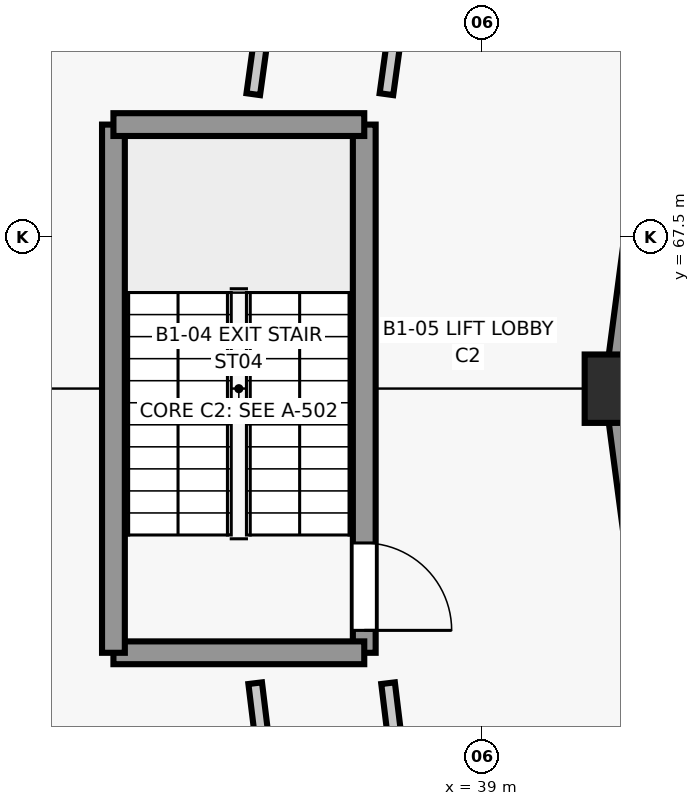
"""IFC4 building model, lengths in metres.
Left out: names, types, materials, properties, quantities, classifications, styles, units other than length and angle.
Written with IfcOpenShell. Run it as: python <this file> out.ifc"""

import sys

from ifc_helpers import new_model, si_unit, direction, frame, frame_2d, origin, origin_2d, place, context, subcontext, project, spatial, rectangle, circle, extrude, element, fill, save


model = new_model("IFC4")
c1 = context("Model", 3, precision=1e-05, world=origin(), true_north=direction((0.0, 1.0)))
c2 = subcontext(c1, "Body", "Model", "MODEL_VIEW")
j1 = project(units=[si_unit("LENGTHUNIT", "METRE"), si_unit("PLANEANGLEUNIT", "RADIAN")], contexts=[c1])
p1 = place(None, origin())
s1 = spatial("IfcSite", under=j1, at=p1, CompositionType="ELEMENT")
p2 = place(p1, origin())
s2 = spatial("IfcBuilding", under=s1, at=p2, CompositionType="ELEMENT")
p3 = place(p2, frame((0.0, 0.0, -4.2)))
s3 = spatial("IfcBuildingStorey", under=s2, at=p3, CompositionType="ELEMENT", Elevation=-4.2)
p4 = place(p3, frame((40.8, 65.5, 0.0), z_axis=(0.0, 0.0, 1.0), x_axis=(1.0, 0.0, 0.0)))
e1 = element("IfcColumn", 1, at=p4, inside=s3, PredefinedType="COLUMN", context=c2, shape_type="SweptSolid", body=[
    extrude(circle(Radius=0.45, at=origin_2d()), origin(), (0.0, 0.0, 1.0), 4.2),
])
p5 = place(p3, frame((31.963, 65.975, 0.0), z_axis=(0.0, 0.0, 1.0), x_axis=(0.130513242145, 0.991446566197, 0.0)))
e2 = element("IfcWall", 2, at=p5, inside=s3, PredefinedType="SHEAR", context=c2, shape_type="SweptSolid", body=[
    extrude(rectangle(XDim=11.076, YDim=0.4, at=frame_2d((5.538, 0.0))), origin(), (0.0, 0.0, 1.0), 3.92),
])
p6 = place(p3, frame((42.031, 74.853, 0.0), z_axis=(0.0, 0.0, 1.0), x_axis=(-0.130549698469, -0.991441766434, 0.0)))
e3 = element("IfcWall", 3, at=p6, inside=s3, PredefinedType="SHEAR", context=c2, shape_type="SweptSolid", body=[
    extrude(rectangle(XDim=9.156, YDim=0.38, at=frame_2d((4.578, 0.0))), origin(), (0.0, 0.0, 1.0), 3.92),
])
p7 = place(p3, frame((33.408, 54.044, 0.0), z_axis=(0.0, 0.0, 1.0), x_axis=(-0.130513242145, 0.991446566197, 0.0)))
e4 = element("IfcWall", 4, at=p7, inside=s3, PredefinedType="SHEAR", context=c2, shape_type="SweptSolid", body=[
    extrude(rectangle(XDim=11.076, YDim=0.4, at=frame_2d((5.538, 0.0))), origin(), (0.0, 0.0, 1.0), 3.92),
])
p8 = place(p3, frame((40.836, 65.225, 0.0), z_axis=(0.0, 0.0, 1.0), x_axis=(0.130549698469, -0.991441766434, 0.0)))
e5 = element("IfcWall", 5, at=p8, inside=s3, PredefinedType="SHEAR", context=c2, shape_type="SweptSolid", body=[
    extrude(rectangle(XDim=9.156, YDim=0.38, at=frame_2d((4.578, 0.0))), origin(), (0.0, 0.0, 1.0), 3.92),
])
p9 = place(p3, frame((37.45, 68.975, 0.0), z_axis=(0.0, 0.0, 1.0), x_axis=(0.0, -1.0, 0.0)))
e6 = element("IfcWall", 6, at=p9, inside=s3, PredefinedType="SHEAR", context=c2, shape_type="SweptSolid", body=[
    extrude(rectangle(XDim=6.95, YDim=0.3, at=frame_2d((3.475, 0.0))), origin(), (0.0, 0.0, 1.0), 4.2),
])
p10 = place(p9, frame((5.505, 0.0, 0.0)))
e7 = element("IfcOpeningElement", 7, at=p10, cuts=e6, PredefinedType="OPENING", context=c2, shape_type="SweptSolid", body=[
    extrude(rectangle(XDim=1.15, YDim=2.15, at=frame_2d((0.575, 1.075))), frame((0.0, 0.16, 0.0), z_axis=(0.0, -1.0, 0.0), x_axis=(1.0, 0.0, 0.0)), (0.0, 0.0, 1.0), 0.32),
])
p11 = place(p3, frame((37.45, 62.025, 0.0), z_axis=(0.0, 0.0, 1.0), x_axis=(-1.0, 0.0, 0.0)))
e8 = element("IfcWall", 8, at=p11, inside=s3, PredefinedType="SHEAR", context=c2, shape_type="SweptSolid", body=[
    extrude(rectangle(XDim=3.3, YDim=0.3, at=frame_2d((1.65, 0.0))), origin(), (0.0, 0.0, 1.0), 4.2),
])
p12 = place(p3, frame((34.15, 62.025, 0.0), z_axis=(0.0, 0.0, 1.0), x_axis=(0.0, 1.0, 0.0)))
e9 = element("IfcWall", 9, at=p12, inside=s3, PredefinedType="SHEAR", context=c2, shape_type="SweptSolid", body=[
    extrude(rectangle(XDim=6.95, YDim=0.3, at=frame_2d((3.475, 0.0))), origin(), (0.0, 0.0, 1.0), 4.2),
])
p13 = place(p3, frame((34.15, 68.975, 0.0), z_axis=(0.0, 0.0, 1.0), x_axis=(1.0, 0.0, 0.0)))
e10 = element("IfcWall", 10, at=p13, inside=s3, PredefinedType="SHEAR", context=c2, shape_type="SweptSolid", body=[
    extrude(rectangle(XDim=3.3, YDim=0.3, at=frame_2d((1.65, 0.0))), origin(), (0.0, 0.0, 1.0), 4.2),
])
p14 = place(p3, frame((37.001, 76.695, 0.0), z_axis=(0.0, 0.0, 1.0), x_axis=(-0.136812919882, -0.990596903363, 0.0)))
e11 = element("IfcWall", 11, at=p14, inside=s3, PredefinedType="PARTITIONING", context=c2, shape_type="SweptSolid", body=[
    extrude(rectangle(XDim=7.39, YDim=0.18, at=frame_2d((3.695, 0.0))), origin(), (0.0, 0.0, 1.0), 3.915),
])
p15 = place(p14, frame((2.97, 0.0, 0.0)))
e12 = element("IfcOpeningElement", 12, at=p15, cuts=e11, PredefinedType="OPENING", context=c2, shape_type="SweptSolid", body=[
    extrude(rectangle(XDim=1.45, YDim=2.2, at=frame_2d((0.725, 1.1))), frame((0.0, 0.1, 0.0), z_axis=(0.0, -1.0, 0.0), x_axis=(1.0, 0.0, 0.0)), (0.0, 0.0, 1.0), 0.2),
])
p16 = place(p3, frame((38.689, 76.234, 0.0), z_axis=(0.0, 0.0, 1.0), x_axis=(-0.136839031307, -0.990593296722, 0.0)))
e13 = element("IfcWall", 13, at=p16, inside=s3, PredefinedType="PARTITIONING", context=c2, shape_type="SweptSolid", body=[
    extrude(rectangle(XDim=6.924, YDim=0.18, at=frame_2d((3.462, 0.0))), origin(), (0.0, 0.0, 1.0), 3.915),
])
p17 = place(p16, frame((2.987, 0.0, 0.0)))
e14 = element("IfcOpeningElement", 14, at=p17, cuts=e13, PredefinedType="OPENING", context=c2, shape_type="SweptSolid", body=[
    extrude(rectangle(XDim=0.95, YDim=2.1, at=frame_2d((0.475, 1.05))), frame((0.0, 0.1, 0.0), z_axis=(0.0, -1.0, 0.0), x_axis=(1.0, 0.0, 0.0)), (0.0, 0.0, 1.0), 0.2),
])
p18 = place(p3, frame((36.015, 61.625, 0.0), z_axis=(0.0, 0.0, 1.0), x_axis=(0.121095426368, -0.992640870463, 0.0)))
e15 = element("IfcWall", 15, at=p18, inside=s3, PredefinedType="PARTITIONING", context=c2, shape_type="SweptSolid", body=[
    extrude(rectangle(XDim=6.718, YDim=0.18, at=frame_2d((3.359, 0.0))), origin(), (0.0, 0.0, 1.0), 3.915),
])
p19 = place(p18, frame((2.834, 0.0, 0.0)))
e16 = element("IfcOpeningElement", 16, at=p19, cuts=e15, PredefinedType="OPENING", context=c2, shape_type="SweptSolid", body=[
    extrude(rectangle(XDim=1.05, YDim=2.1, at=frame_2d((0.525, 1.05))), frame((0.0, 0.1, 0.0), z_axis=(0.0, -1.0, 0.0), x_axis=(1.0, 0.0, 0.0)), (0.0, 0.0, 1.0), 0.2),
])
p20 = place(p3, frame((37.763, 61.625, 0.0), z_axis=(0.0, 0.0, 1.0), x_axis=(0.12105344106, -0.992645991483, 0.0)))
e17 = element("IfcWall", 17, at=p20, inside=s3, PredefinedType="PARTITIONING", context=c2, shape_type="SweptSolid", body=[
    extrude(rectangle(XDim=6.28, YDim=0.18, at=frame_2d((3.14, 0.0))), origin(), (0.0, 0.0, 1.0), 3.915),
])
p21 = place(p20, frame((2.54, 0.0, 0.0)))
e18 = element("IfcOpeningElement", 18, at=p21, cuts=e17, PredefinedType="OPENING", context=c2, shape_type="SweptSolid", body=[
    extrude(rectangle(XDim=1.2, YDim=2.15, at=frame_2d((0.6, 1.075))), frame((0.0, 0.1, 0.0), z_axis=(0.0, -1.0, 0.0), x_axis=(1.0, 0.0, 0.0)), (0.0, 0.0, 1.0), 0.2),
])
p22 = place(p10, origin())
e19 = element("IfcDoor", 19, at=p22, inside=s3, OperationType="SINGLE_SWING_RIGHT", PredefinedType="DOOR", context=c2, shape_type="SweptSolid", body=[
    extrude(rectangle(XDim=1.15, YDim=2.15, at=frame_2d((0.575, 1.075))), frame((0.0, 0.025, 0.0), z_axis=(0.0, -1.0, 0.0), x_axis=(1.0, 0.0, 0.0)), (0.0, 0.0, 1.0), 0.05),
])
fill(e7, e19)
save(model, sys.argv[1])
